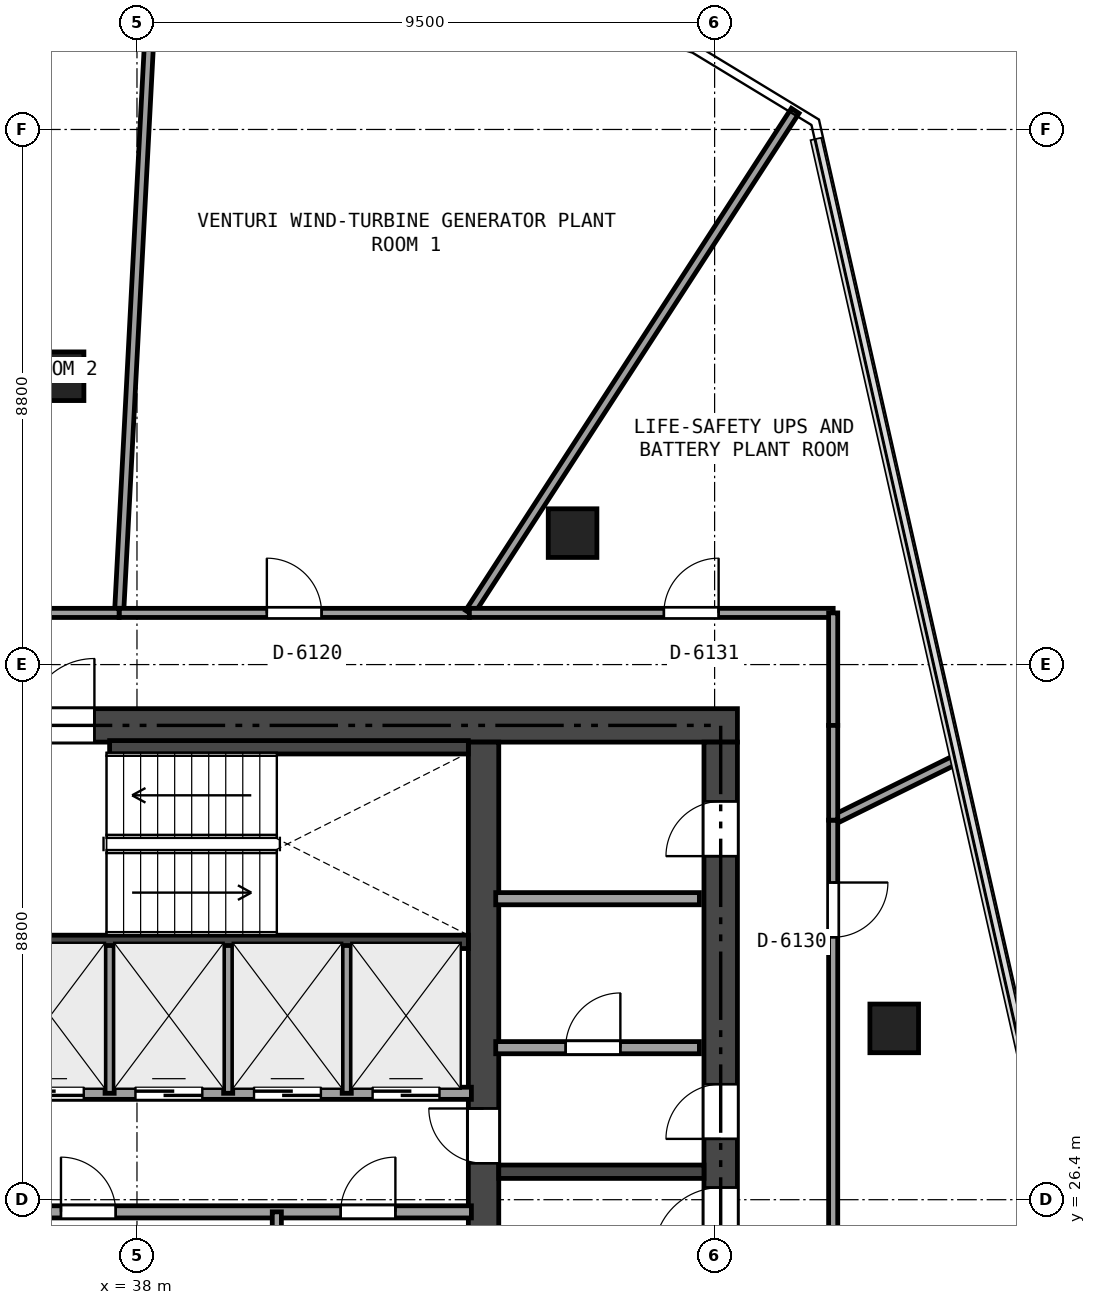
"""IFC4 building model, lengths in metres.
Left out: names, types, materials, properties, quantities, classifications, styles, units other than length and angle.
Written with IfcOpenShell. Run it as: python <this file> out.ifc"""

import sys

from ifc_helpers import new_model, si_unit, direction, frame, frame_2d, origin, origin_2d, place, context, subcontext, project, spatial, rectangle, extrude, element, fill, save


model = new_model("IFC4")
c1 = context("Model", 3, precision=1e-05, world=origin(), true_north=direction((0.0, 1.0)))
c2 = subcontext(c1, "Body", "Model", "MODEL_VIEW")
j1 = project(units=[si_unit("LENGTHUNIT", "METRE"), si_unit("PLANEANGLEUNIT", "RADIAN")], contexts=[c1])
p1 = place(None, origin())
s1 = spatial("IfcSite", under=j1, at=p1, CompositionType="ELEMENT")
p2 = place(p1, origin())
s2 = spatial("IfcBuilding", under=s1, at=p2, CompositionType="ELEMENT")
p3 = place(p2, frame((0.0, 0.0, 228.3)))
s3 = spatial("IfcBuildingStorey", under=s2, at=p3, CompositionType="ELEMENT", Elevation=228.3)
p4 = place(p3, frame((26.525, 34.2, 0.0), z_axis=(0.0, 0.0, 1.0), x_axis=(1.0, 0.0, 0.0)))
e1 = element("IfcWall", 1, at=p4, inside=s3, PredefinedType="SHEAR", context=c2, shape_type="SweptSolid", body=[
    extrude(rectangle(XDim=21.35, YDim=0.55, at=frame_2d((10.675, 0.0))), origin(), (0.0, 0.0, 1.0), 3.24),
])
p5 = place(p4, frame((9.675, 0.0, 0.0)))
e2 = element("IfcOpeningElement", 2, at=p5, cuts=e1, PredefinedType="OPENING", context=c2, shape_type="SweptSolid", body=[
    extrude(rectangle(XDim=1.1, YDim=2.15, at=frame_2d((0.55, 1.075))), frame((0.0, 0.285, 0.0), z_axis=(0.0, -1.0, 0.0), x_axis=(1.0, 0.0, 0.0)), (0.0, 0.0, 1.0), 0.57),
])
p6 = place(p4, frame((1.925, 0.0, 0.0)))
e3 = element("IfcOpeningElement", 3, at=p6, cuts=e1, PredefinedType="OPENING", context=c2, shape_type="SweptSolid", body=[
    extrude(rectangle(XDim=0.9, YDim=2.1, at=frame_2d((0.45, 1.05))), frame((0.0, 0.285, 0.0), z_axis=(0.0, -1.0, 0.0), x_axis=(1.0, 0.0, 0.0)), (0.0, 0.0, 1.0), 0.57),
])
p7 = place(p4, frame((6.225, 0.0, 0.0)))
e4 = element("IfcOpeningElement", 4, at=p7, cuts=e1, PredefinedType="OPENING", context=c2, shape_type="SweptSolid", body=[
    extrude(rectangle(XDim=0.9, YDim=2.1, at=frame_2d((0.45, 1.05))), frame((0.0, 0.285, 0.0), z_axis=(0.0, -1.0, 0.0), x_axis=(1.0, 0.0, 0.0)), (0.0, 0.0, 1.0), 0.57),
])
p8 = place(p3, frame((47.6, 18.875, 0.0), z_axis=(0.0, 0.0, 1.0), x_axis=(0.0, 1.0, 0.0)))
e5 = element("IfcWall", 5, at=p8, inside=s3, PredefinedType="SHEAR", context=c2, shape_type="SweptSolid", body=[
    extrude(rectangle(XDim=15.05, YDim=0.55, at=frame_2d((7.525, 0.0))), origin(), (0.0, 0.0, 1.0), 3.24),
])
p9 = place(p8, frame((6.625, 0.0, 0.0)))
e6 = element("IfcOpeningElement", 6, at=p9, cuts=e5, PredefinedType="OPENING", context=c2, shape_type="SweptSolid", body=[
    extrude(rectangle(XDim=1.1, YDim=2.15, at=frame_2d((0.55, 1.075))), frame((0.0, 0.285, 0.0), z_axis=(0.0, -1.0, 0.0), x_axis=(1.0, 0.0, 0.0)), (0.0, 0.0, 1.0), 0.57),
])
p10 = place(p8, frame((8.525, 0.0, 0.0)))
e7 = element("IfcOpeningElement", 7, at=p10, cuts=e5, PredefinedType="OPENING", context=c2, shape_type="SweptSolid", body=[
    extrude(rectangle(XDim=0.9, YDim=2.1, at=frame_2d((0.45, 1.05))), frame((0.0, 0.285, 0.0), z_axis=(0.0, -1.0, 0.0), x_axis=(1.0, 0.0, 0.0)), (0.0, 0.0, 1.0), 0.57),
])
p11 = place(p8, frame((13.175, 0.0, 0.0)))
e8 = element("IfcOpeningElement", 8, at=p11, cuts=e5, PredefinedType="OPENING", context=c2, shape_type="SweptSolid", body=[
    extrude(rectangle(XDim=0.9, YDim=2.1, at=frame_2d((0.45, 1.05))), frame((0.0, 0.285, 0.0), z_axis=(0.0, -1.0, 0.0), x_axis=(1.0, 0.0, 0.0)), (0.0, 0.0, 1.0), 0.57),
])
p12 = place(p3, frame((43.7, 18.875, 0.0), z_axis=(0.0, 0.0, 1.0), x_axis=(0.0, 1.0, 0.0)))
e9 = element("IfcWall", 9, at=p12, inside=s3, PredefinedType="SHEAR", context=c2, shape_type="SweptSolid", body=[
    extrude(rectangle(XDim=15.05, YDim=0.5, at=frame_2d((7.525, 0.0))), origin(), (0.0, 0.0, 1.0), 3.24),
])
p13 = place(p12, frame((8.125, 0.0, 0.0)))
e10 = element("IfcOpeningElement", 10, at=p13, cuts=e9, PredefinedType="OPENING", context=c2, shape_type="SweptSolid", body=[
    extrude(rectangle(XDim=0.9, YDim=2.1, at=frame_2d((0.45, 1.05))), frame((0.0, 0.26, 0.0), z_axis=(0.0, -1.0, 0.0), x_axis=(1.0, 0.0, 0.0)), (0.0, 0.0, 1.0), 0.52),
])
p14 = place(p3, frame((43.95, 26.86, 0.0), z_axis=(0.0, 0.0, 1.0), x_axis=(1.0, 0.0, 0.0)))
e11 = element("IfcWall", 11, at=p14, inside=s3, PredefinedType="SHEAR", context=c2, shape_type="SweptSolid", body=[
    extrude(rectangle(XDim=3.375, YDim=0.22, at=frame_2d((1.688, 0.0))), origin(), (0.0, 0.0, 1.0), 3.24),
])
p15 = place(p3, frame((35.84, 30.64, 0.0), z_axis=(0.0, 0.0, 1.0), x_axis=(1.0, 0.0, 0.0)))
e12 = element("IfcWall", 12, at=p15, inside=s3, PredefinedType="SHEAR", context=c2, shape_type="SweptSolid", body=[
    extrude(rectangle(XDim=7.61, YDim=0.22, at=frame_2d((3.805, 0.0))), origin(), (0.0, 0.0, 1.0), 3.24),
])
p16 = place(p3, frame((37.55, 33.84, 0.0), z_axis=(0.0, 0.0, 1.0), x_axis=(1.0, 0.0, 0.0)))
e13 = element("IfcWall", 13, at=p16, inside=s3, PredefinedType="SHEAR", context=c2, shape_type="SweptSolid", body=[
    extrude(rectangle(XDim=5.9, YDim=0.22, at=frame_2d((2.95, 0.0))), origin(), (0.0, 0.0, 1.0), 3.24),
])
for number, where, z_axis, x_axis in (
    (14, (50.454, 29.217, -0.345), (0.0, 0.0, 1.0), (1.0, 0.0, 0.0)),
    (15, (45.164, 37.362, -0.345), (0.0, 0.0, 1.0), (1.0, 0.0, 0.0)),
    (16, (36.727, 39.942, -0.345), (0.0, 0.0, 1.0), (1.0, 0.0, 0.0)),
):
    element("IfcColumn", number, at=place(p3, frame(where, z_axis=z_axis, x_axis=x_axis)), inside=s3, PredefinedType="COLUMN", context=c2, shape_type="SweptSolid", body=[
        extrude(rectangle(XDim=0.8, YDim=0.8, at=origin_2d()), origin(), (0.0, 0.0, 1.0), 3.585),
    ])
p17 = place(p3, frame((43.9, 28.9, 0.0), z_axis=(0.0, 0.0, 1.0), x_axis=(1.0, 0.0, 0.0)))
e17 = element("IfcWall", 17, at=p17, inside=s3, PredefinedType="SOLIDWALL", context=c2, shape_type="SweptSolid", body=[
    extrude(rectangle(XDim=3.35, YDim=0.2, at=frame_2d((1.675, 0.0))), origin(), (0.0, 0.0, 1.0), 3.24),
])
p18 = place(p17, frame((1.15, 0.0, 0.0)))
e18 = element("IfcOpeningElement", 18, at=p18, cuts=e17, PredefinedType="OPENING", context=c2, shape_type="SweptSolid", body=[
    extrude(rectangle(XDim=0.9, YDim=2.1, at=frame_2d((0.45, 1.05))), frame((0.0, 0.11, 0.0), z_axis=(0.0, -1.0, 0.0), x_axis=(1.0, 0.0, 0.0)), (0.0, 0.0, 1.0), 0.22),
])
p19 = place(p3, frame((43.9, 31.35, 0.0), z_axis=(0.0, 0.0, 1.0), x_axis=(1.0, 0.0, 0.0)))
e19 = element("IfcWall", 19, at=p19, inside=s3, PredefinedType="SOLIDWALL", context=c2, shape_type="SweptSolid", body=[
    extrude(rectangle(XDim=3.35, YDim=0.2, at=frame_2d((1.675, 0.0))), origin(), (0.0, 0.0, 1.0), 2.913),
])
p20 = place(p3, frame((35.62, 28.15, 0.0), z_axis=(0.0, 0.0, 1.0), x_axis=(1.0, 0.0, 0.0)))
e20 = element("IfcWall", 20, at=p20, inside=s3, PredefinedType="SOLIDWALL", context=c2, shape_type="SweptSolid", body=[
    extrude(rectangle(XDim=7.88, YDim=0.2, at=frame_2d((3.94, 0.0))), origin(), (0.0, 0.0, 1.0), 3.24),
])
p21 = place(p20, frame((0.405, 0.0, 0.0)))
e21 = element("IfcOpeningElement", 21, at=p21, cuts=e20, PredefinedType="OPENING", context=c2, shape_type="SweptSolid", body=[
    extrude(rectangle(XDim=1.1, YDim=2.15, at=frame_2d((0.55, 1.075))), frame((0.0, 0.11, 0.0), z_axis=(0.0, -1.0, 0.0), x_axis=(1.0, 0.0, 0.0)), (0.0, 0.0, 1.0), 0.22),
])
p22 = place(p20, frame((2.355, 0.0, 0.0)))
e22 = element("IfcOpeningElement", 22, at=p22, cuts=e20, PredefinedType="OPENING", context=c2, shape_type="SweptSolid", body=[
    extrude(rectangle(XDim=1.1, YDim=2.15, at=frame_2d((0.55, 1.075))), frame((0.0, 0.11, 0.0), z_axis=(0.0, -1.0, 0.0), x_axis=(1.0, 0.0, 0.0)), (0.0, 0.0, 1.0), 0.22),
])
p23 = place(p20, frame((4.305, 0.0, 0.0)))
e23 = element("IfcOpeningElement", 23, at=p23, cuts=e20, PredefinedType="OPENING", context=c2, shape_type="SweptSolid", body=[
    extrude(rectangle(XDim=1.1, YDim=2.15, at=frame_2d((0.55, 1.075))), frame((0.0, 0.11, 0.0), z_axis=(0.0, -1.0, 0.0), x_axis=(1.0, 0.0, 0.0)), (0.0, 0.0, 1.0), 0.22),
])
p24 = place(p20, frame((6.255, 0.0, 0.0)))
e24 = element("IfcOpeningElement", 24, at=p24, cuts=e20, PredefinedType="OPENING", context=c2, shape_type="SweptSolid", body=[
    extrude(rectangle(XDim=1.1, YDim=2.15, at=frame_2d((0.55, 1.075))), frame((0.0, 0.11, 0.0), z_axis=(0.0, -1.0, 0.0), x_axis=(1.0, 0.0, 0.0)), (0.0, 0.0, 1.0), 0.22),
])
p25 = place(p3, frame((35.62, 26.2, 0.0), z_axis=(0.0, 0.0, 1.0), x_axis=(1.0, 0.0, 0.0)))
e25 = element("IfcWall", 25, at=p25, inside=s3, PredefinedType="SOLIDWALL", context=c2, shape_type="SweptSolid", body=[
    extrude(rectangle(XDim=7.88, YDim=0.2, at=frame_2d((3.94, 0.0))), origin(), (0.0, 0.0, 1.0), 3.24),
])
p26 = place(p25, frame((1.13, 0.0, 0.0)))
e26 = element("IfcOpeningElement", 26, at=p26, cuts=e25, PredefinedType="OPENING", context=c2, shape_type="SweptSolid", body=[
    extrude(rectangle(XDim=0.9, YDim=2.1, at=frame_2d((0.45, 1.05))), frame((0.0, 0.11, 0.0), z_axis=(0.0, -1.0, 0.0), x_axis=(1.0, 0.0, 0.0)), (0.0, 0.0, 1.0), 0.22),
])
p27 = place(p25, frame((5.73, 0.0, 0.0)))
e27 = element("IfcOpeningElement", 27, at=p27, cuts=e25, PredefinedType="OPENING", context=c2, shape_type="SweptSolid", body=[
    extrude(rectangle(XDim=0.9, YDim=2.1, at=frame_2d((0.45, 1.05))), frame((0.0, 0.11, 0.0), z_axis=(0.0, -1.0, 0.0), x_axis=(1.0, 0.0, 0.0)), (0.0, 0.0, 1.0), 0.22),
])
for number, where, z_axis, x_axis in (
    (28, (37.55, 28.15, 0.0), (0.0, 0.0, 1.0), (0.0, 1.0, 0.0)),
    (29, (39.5, 28.15, 0.0), (0.0, 0.0, 1.0), (0.0, 1.0, 0.0)),
    (30, (41.45, 28.15, 0.0), (0.0, 0.0, 1.0), (0.0, 1.0, 0.0)),
):
    element("IfcWall", number, at=place(p3, frame(where, z_axis=z_axis, x_axis=x_axis)), inside=s3, PredefinedType="PARTITIONING", context=c2, shape_type="SweptSolid", body=[
        extrude(rectangle(XDim=2.43, YDim=0.15, at=frame_2d((1.215, 0.0))), origin(), (0.0, 0.0, 1.0), 3.24),
    ])
p28 = place(p3, frame((40.3, 23.65, 0.0), z_axis=(0.0, 0.0, 1.0), x_axis=(0.0, 1.0, 0.0)))
e31 = element("IfcWall", 31, at=p28, inside=s3, PredefinedType="PARTITIONING", context=c2, shape_type="SweptSolid", body=[
    extrude(rectangle(XDim=2.55, YDim=0.15, at=frame_2d((1.275, 0.0))), origin(), (0.0, 0.0, 1.0), 2.761),
])
p29 = place(p3, frame((38.318, 47.711, 0.0), z_axis=(0.0, 0.0, 1.0), x_axis=(-0.052416173525, -0.998625327514, 0.0)))
e32 = element("IfcWall", 32, at=p29, inside=s3, PredefinedType="PARTITIONING", context=c2, shape_type="SweptSolid", body=[
    extrude(rectangle(XDim=11.677, YDim=0.15, at=frame_2d((5.838, 0.0))), origin(), (0.0, 0.0, 1.0), 2.765),
])
p30 = place(p3, frame((37.706, 36.05, 0.0), z_axis=(0.0, 0.0, 1.0), x_axis=(1.0, 0.0, 0.0)))
e33 = element("IfcWall", 33, at=p30, inside=s3, PredefinedType="PARTITIONING", context=c2, shape_type="SweptSolid", body=[
    extrude(rectangle(XDim=5.761, YDim=0.15, at=frame_2d((2.88, 0.0))), origin(), (0.0, 0.0, 1.0), 2.913),
])
p31 = place(p30, frame((2.43, 0.0, 0.0)))
e34 = element("IfcOpeningElement", 34, at=p31, cuts=e33, PredefinedType="OPENING", context=c2, shape_type="SweptSolid", body=[
    extrude(rectangle(XDim=0.9, YDim=2.0, at=frame_2d((0.45, 1.0))), frame((0.0, 0.085, 0.0), z_axis=(0.0, -1.0, 0.0), x_axis=(1.0, 0.0, 0.0)), (0.0, 0.0, 1.0), 0.17),
])
p32 = place(p3, frame((43.467, 36.05, 0.0), z_axis=(0.0, 0.0, 1.0), x_axis=(0.544343030284, 0.838862721416, 0.0)))
e35 = element("IfcWall", 35, at=p32, inside=s3, PredefinedType="PARTITIONING", context=c2, shape_type="SweptSolid", body=[
    extrude(rectangle(XDim=9.843, YDim=0.15, at=frame_2d((4.921, 0.0))), origin(), (0.0, 0.0, 1.0), 2.765),
])
p33 = place(p3, frame((32.283, 36.05, 0.0), z_axis=(0.0, 0.0, 1.0), x_axis=(1.0, 0.0, 0.0)))
e36 = element("IfcWall", 36, at=p33, inside=s3, PredefinedType="PARTITIONING", context=c2, shape_type="SweptSolid", body=[
    extrude(rectangle(XDim=5.423, YDim=0.15, at=frame_2d((2.711, 0.0))), origin(), (0.0, 0.0, 1.0), 2.689),
])
p34 = place(p33, frame((2.262, 0.0, 0.0)))
e37 = element("IfcOpeningElement", 37, at=p34, cuts=e36, PredefinedType="OPENING", context=c2, shape_type="SweptSolid", body=[
    extrude(rectangle(XDim=0.9, YDim=2.0, at=frame_2d((0.45, 1.0))), frame((0.0, 0.085, 0.0), z_axis=(0.0, -1.0, 0.0), x_axis=(1.0, 0.0, 0.0)), (0.0, 0.0, 1.0), 0.17),
])
p35 = place(p3, frame((51.508, 33.657, 0.0), z_axis=(0.0, 0.0, 1.0), x_axis=(-0.89688185474, -0.442270209983, 0.0)))
e38 = element("IfcWall", 38, at=p35, inside=s3, PredefinedType="PARTITIONING", context=c2, shape_type="SweptSolid", body=[
    extrude(rectangle(XDim=2.295, YDim=0.15, at=frame_2d((1.147, 0.0))), origin(), (0.0, 0.0, 1.0), 3.24),
])
p36 = place(p3, frame((49.45, 32.642, 0.0), z_axis=(0.0, 0.0, 1.0), x_axis=(0.0, -1.0, 0.0)))
e39 = element("IfcWall", 39, at=p36, inside=s3, PredefinedType="PARTITIONING", context=c2, shape_type="SweptSolid", body=[
    extrude(rectangle(XDim=6.884, YDim=0.15, at=frame_2d((3.442, 0.0))), origin(), (0.0, 0.0, 1.0), 2.689),
])
p37 = place(p36, frame((1.026, 0.0, 0.0)))
e40 = element("IfcOpeningElement", 40, at=p37, cuts=e39, PredefinedType="OPENING", context=c2, shape_type="SweptSolid", body=[
    extrude(rectangle(XDim=0.9, YDim=2.0, at=frame_2d((0.45, 1.0))), frame((0.0, 0.085, 0.0), z_axis=(0.0, -1.0, 0.0), x_axis=(1.0, 0.0, 0.0)), (0.0, 0.0, 1.0), 0.17),
])
p38 = place(p3, frame((43.467, 36.05, 0.0), z_axis=(0.0, 0.0, 1.0), x_axis=(1.0, 0.0, 0.0)))
e41 = element("IfcWall", 41, at=p38, inside=s3, PredefinedType="PARTITIONING", context=c2, shape_type="SweptSolid", body=[
    extrude(rectangle(XDim=5.983, YDim=0.15, at=frame_2d((2.991, 0.0))), origin(), (0.0, 0.0, 1.0), 2.689),
])
p39 = place(p38, frame((3.199, 0.0, 0.0)))
e42 = element("IfcOpeningElement", 42, at=p39, cuts=e41, PredefinedType="OPENING", context=c2, shape_type="SweptSolid", body=[
    extrude(rectangle(XDim=0.9, YDim=2.0, at=frame_2d((0.45, 1.0))), frame((0.0, 0.085, 0.0), z_axis=(0.0, -1.0, 0.0), x_axis=(1.0, 0.0, 0.0)), (0.0, 0.0, 1.0), 0.17),
])
p40 = place(p3, frame((49.45, 36.05, 0.0), z_axis=(0.0, 0.0, 1.0), x_axis=(0.0, -1.0, 0.0)))
e43 = element("IfcWall", 43, at=p40, inside=s3, PredefinedType="PARTITIONING", context=c2, shape_type="SweptSolid", body=[
    extrude(rectangle(XDim=1.85, YDim=0.15, at=frame_2d((0.925, 0.0))), origin(), (0.0, 0.0, 1.0), 3.24),
])
p41 = place(p3, frame((49.45, 34.2, 0.0), z_axis=(0.0, 0.0, 1.0), x_axis=(0.0, -1.0, 0.0)))
e44 = element("IfcWall", 44, at=p41, inside=s3, PredefinedType="PARTITIONING", context=c2, shape_type="SweptSolid", body=[
    extrude(rectangle(XDim=1.558, YDim=0.15, at=frame_2d((0.779, 0.0))), origin(), (0.0, 0.0, 1.0), 3.24),
])
p42 = place(p9, origin())
e45 = element("IfcDoor", 45, at=p42, inside=s3, OperationType="SINGLE_SWING_LEFT", PredefinedType="DOOR", context=c2, shape_type="SweptSolid", body=[
    extrude(rectangle(XDim=1.1, YDim=2.15, at=frame_2d((0.55, 1.075))), frame((0.0, 0.025, 0.0), z_axis=(0.0, -1.0, 0.0), x_axis=(1.0, 0.0, 0.0)), (0.0, 0.0, 1.0), 0.05),
])
fill(e6, e45)
p43 = place(p5, origin())
e46 = element("IfcDoor", 46, at=p43, inside=s3, OperationType="SINGLE_SWING_RIGHT", PredefinedType="DOOR", context=c2, shape_type="SweptSolid", body=[
    extrude(rectangle(XDim=1.1, YDim=2.15, at=frame_2d((0.55, 1.075))), frame((0.0, 0.025, 0.0), z_axis=(0.0, -1.0, 0.0), x_axis=(1.0, 0.0, 0.0)), (0.0, 0.0, 1.0), 0.05),
])
fill(e2, e46)
p44 = place(p13, origin())
e47 = element("IfcDoor", 47, at=p44, inside=s3, OperationType="SINGLE_SWING_RIGHT", PredefinedType="DOOR", context=c2, shape_type="SweptSolid", body=[
    extrude(rectangle(XDim=0.9, YDim=2.1, at=frame_2d((0.45, 1.05))), frame((0.0, 0.025, 0.0), z_axis=(0.0, -1.0, 0.0), x_axis=(1.0, 0.0, 0.0)), (0.0, 0.0, 1.0), 0.05),
])
fill(e10, e47)
p45 = place(p10, origin())
e48 = element("IfcDoor", 48, at=p45, inside=s3, OperationType="SINGLE_SWING_LEFT", PredefinedType="DOOR", context=c2, shape_type="SweptSolid", body=[
    extrude(rectangle(XDim=0.9, YDim=2.1, at=frame_2d((0.45, 1.05))), frame((0.0, 0.025, 0.0), z_axis=(0.0, -1.0, 0.0), x_axis=(1.0, 0.0, 0.0)), (0.0, 0.0, 1.0), 0.05),
])
fill(e7, e48)
p46 = place(p18, origin())
e49 = element("IfcDoor", 49, at=p46, inside=s3, OperationType="SINGLE_SWING_RIGHT", PredefinedType="DOOR", context=c2, shape_type="SweptSolid", body=[
    extrude(rectangle(XDim=0.9, YDim=2.1, at=frame_2d((0.45, 1.05))), frame((0.0, 0.025, 0.0), z_axis=(0.0, -1.0, 0.0), x_axis=(1.0, 0.0, 0.0)), (0.0, 0.0, 1.0), 0.05),
])
fill(e18, e49)
p47 = place(p11, origin())
e50 = element("IfcDoor", 50, at=p47, inside=s3, OperationType="SINGLE_SWING_LEFT", PredefinedType="DOOR", context=c2, shape_type="SweptSolid", body=[
    extrude(rectangle(XDim=0.9, YDim=2.1, at=frame_2d((0.45, 1.05))), frame((0.0, 0.025, 0.0), z_axis=(0.0, -1.0, 0.0), x_axis=(1.0, 0.0, 0.0)), (0.0, 0.0, 1.0), 0.05),
])
fill(e8, e50)
p48 = place(p26, origin())
e51 = element("IfcDoor", 51, at=p48, inside=s3, OperationType="SINGLE_SWING_LEFT", PredefinedType="DOOR", context=c2, shape_type="SweptSolid", body=[
    extrude(rectangle(XDim=0.9, YDim=2.1, at=frame_2d((0.45, 1.05))), frame((0.0, 0.025, 0.0), z_axis=(0.0, -1.0, 0.0), x_axis=(1.0, 0.0, 0.0)), (0.0, 0.0, 1.0), 0.05),
])
fill(e26, e51)
p49 = place(p27, origin())
e52 = element("IfcDoor", 52, at=p49, inside=s3, OperationType="SINGLE_SWING_RIGHT", PredefinedType="DOOR", context=c2, shape_type="SweptSolid", body=[
    extrude(rectangle(XDim=0.9, YDim=2.1, at=frame_2d((0.45, 1.05))), frame((0.0, 0.025, 0.0), z_axis=(0.0, -1.0, 0.0), x_axis=(1.0, 0.0, 0.0)), (0.0, 0.0, 1.0), 0.05),
])
fill(e27, e52)
p50 = place(p21, origin())
e53 = element("IfcDoor", 53, at=p50, inside=s3, OperationType="SLIDING_TO_LEFT", PredefinedType="DOOR", context=c2, shape_type="SweptSolid", body=[
    extrude(rectangle(XDim=1.1, YDim=2.15, at=frame_2d((0.55, 1.075))), frame((0.0, 0.025, 0.0), z_axis=(0.0, -1.0, 0.0), x_axis=(1.0, 0.0, 0.0)), (0.0, 0.0, 1.0), 0.05),
])
fill(e21, e53)
p51 = place(p22, origin())
e54 = element("IfcDoor", 54, at=p51, inside=s3, OperationType="SLIDING_TO_LEFT", PredefinedType="DOOR", context=c2, shape_type="SweptSolid", body=[
    extrude(rectangle(XDim=1.1, YDim=2.15, at=frame_2d((0.55, 1.075))), frame((0.0, 0.025, 0.0), z_axis=(0.0, -1.0, 0.0), x_axis=(1.0, 0.0, 0.0)), (0.0, 0.0, 1.0), 0.05),
])
fill(e22, e54)
p52 = place(p23, origin())
e55 = element("IfcDoor", 55, at=p52, inside=s3, OperationType="SLIDING_TO_LEFT", PredefinedType="DOOR", context=c2, shape_type="SweptSolid", body=[
    extrude(rectangle(XDim=1.1, YDim=2.15, at=frame_2d((0.55, 1.075))), frame((0.0, 0.025, 0.0), z_axis=(0.0, -1.0, 0.0), x_axis=(1.0, 0.0, 0.0)), (0.0, 0.0, 1.0), 0.05),
])
fill(e23, e55)
p53 = place(p24, origin())
e56 = element("IfcDoor", 56, at=p53, inside=s3, OperationType="SLIDING_TO_LEFT", PredefinedType="DOOR", context=c2, shape_type="SweptSolid", body=[
    extrude(rectangle(XDim=1.1, YDim=2.15, at=frame_2d((0.55, 1.075))), frame((0.0, 0.025, 0.0), z_axis=(0.0, -1.0, 0.0), x_axis=(1.0, 0.0, 0.0)), (0.0, 0.0, 1.0), 0.05),
])
fill(e24, e56)
p54 = place(p31, origin())
e57 = element("IfcDoor", 57, at=p54, inside=s3, OperationType="SINGLE_SWING_LEFT", PredefinedType="DOOR", context=c2, shape_type="SweptSolid", body=[
    extrude(rectangle(XDim=0.9, YDim=2.0, at=frame_2d((0.45, 1.0))), frame((0.0, 0.025, 0.0), z_axis=(0.0, -1.0, 0.0), x_axis=(1.0, 0.0, 0.0)), (0.0, 0.0, 1.0), 0.05),
])
fill(e34, e57)
p55 = place(p37, origin())
e58 = element("IfcDoor", 58, at=p55, inside=s3, OperationType="SINGLE_SWING_LEFT", PredefinedType="DOOR", context=c2, shape_type="SweptSolid", body=[
    extrude(rectangle(XDim=0.9, YDim=2.0, at=frame_2d((0.45, 1.0))), frame((0.0, 0.025, 0.0), z_axis=(0.0, -1.0, 0.0), x_axis=(1.0, 0.0, 0.0)), (0.0, 0.0, 1.0), 0.05),
])
fill(e40, e58)
p56 = place(p39, origin())
e59 = element("IfcDoor", 59, at=p56, inside=s3, OperationType="SINGLE_SWING_RIGHT", PredefinedType="DOOR", context=c2, shape_type="SweptSolid", body=[
    extrude(rectangle(XDim=0.9, YDim=2.0, at=frame_2d((0.45, 1.0))), frame((0.0, 0.025, 0.0), z_axis=(0.0, -1.0, 0.0), x_axis=(1.0, 0.0, 0.0)), (0.0, 0.0, 1.0), 0.05),
])
fill(e42, e59)
save(model, sys.argv[1])
